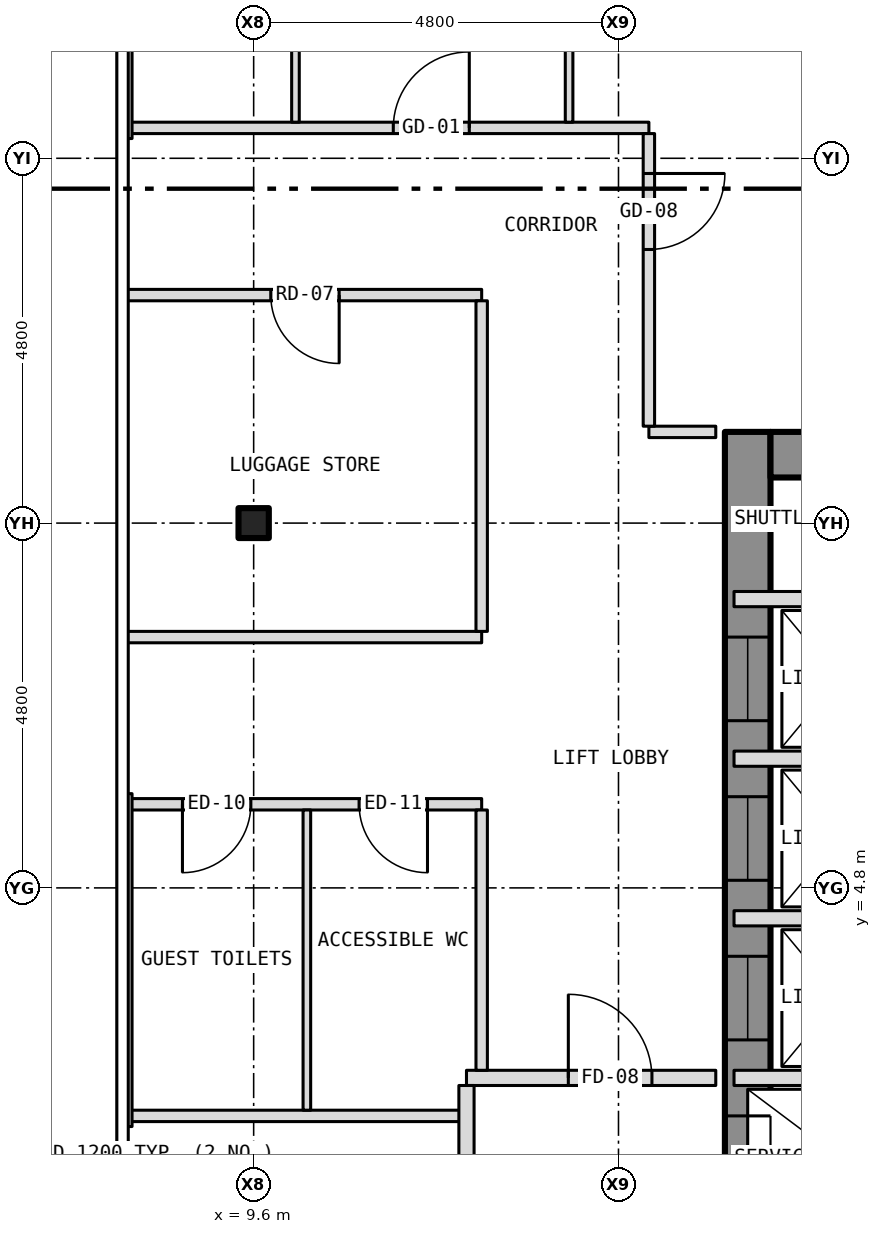
"""IFC4 building model, lengths in metres.
Left out: names, types, materials, properties, quantities, classifications, styles, units other than length and angle.
Written with IfcOpenShell. Run it as: python <this file> out.ifc"""

import sys

from ifc_helpers import new_model, si_unit, direction, frame, frame_2d, origin, origin_2d, place, context, subcontext, project, spatial, rectangle, i_section, extrude, element, fill, save


model = new_model("IFC4")
c1 = context("Model", 3, precision=1e-05, world=origin(), true_north=direction((0.0, 1.0)))
c2 = subcontext(c1, "Body", "Model", "MODEL_VIEW")
j1 = project(units=[si_unit("LENGTHUNIT", "METRE"), si_unit("PLANEANGLEUNIT", "RADIAN")], contexts=[c1])
p1 = place(None, origin())
s1 = spatial("IfcSite", under=j1, at=p1, CompositionType="ELEMENT")
p2 = place(p1, origin())
s2 = spatial("IfcBuilding", under=s1, at=p2, CompositionType="ELEMENT")
p3 = place(p2, frame((0.0, 0.0, 124.0)))
s3 = spatial("IfcBuildingStorey", under=s2, at=p3, CompositionType="ELEMENT", Elevation=124.0)
p4 = place(p3, frame((9.6, 9.6, -0.15), z_axis=(0.0, 0.0, 1.0), x_axis=(1.0, 0.0, 0.0)))
e1 = element("IfcColumn", 1, at=p4, inside=s3, PredefinedType="COLUMN", context=c2, shape_type="SweptSolid", body=[
    extrude(i_section(OverallWidth=0.399, OverallDepth=0.394, WebThickness=0.023, FlangeThickness=0.037, at=origin_2d()), origin(), (0.0, 0.0, 1.0), 3.5),
])
p5 = place(p3, frame((16.1, -10.8, 0.0), z_axis=(0.0, 0.0, 1.0), x_axis=(0.0, 1.0, 0.0)))
e2 = element("IfcWall", 2, at=p5, inside=s3, PredefinedType="SHEAR", context=c2, shape_type="SweptSolid", body=[
    extrude(rectangle(XDim=21.6, YDim=0.6, at=frame_2d((10.8, 0.0))), origin(), (0.0, 0.0, 1.0), 3.25),
])
p6 = place(p5, frame((9.4, 0.0, 0.0)))
e3 = element("IfcOpeningElement", 3, at=p6, cuts=e2, PredefinedType="OPENING", context=c2, shape_type="SweptSolid", body=[
    extrude(rectangle(XDim=1.1, YDim=2.1, at=frame_2d((0.55, 1.05))), frame((0.0, 0.312, 0.0), z_axis=(0.0, -1.0, 0.0), x_axis=(1.0, 0.0, 0.0)), (0.0, 0.0, 1.0), 0.624),
])
p7 = place(p5, frame((11.5, 0.0, 0.0)))
e4 = element("IfcOpeningElement", 4, at=p7, cuts=e2, PredefinedType="OPENING", context=c2, shape_type="SweptSolid", body=[
    extrude(rectangle(XDim=1.1, YDim=2.1, at=frame_2d((0.55, 1.05))), frame((0.0, 0.312, 0.0), z_axis=(0.0, -1.0, 0.0), x_axis=(1.0, 0.0, 0.0)), (0.0, 0.0, 1.0), 0.624),
])
p8 = place(p5, frame((13.6, 0.0, 0.0)))
e5 = element("IfcOpeningElement", 5, at=p8, cuts=e2, PredefinedType="OPENING", context=c2, shape_type="SweptSolid", body=[
    extrude(rectangle(XDim=1.1, YDim=2.1, at=frame_2d((0.55, 1.05))), frame((0.0, 0.312, 0.0), z_axis=(0.0, -1.0, 0.0), x_axis=(1.0, 0.0, 0.0)), (0.0, 0.0, 1.0), 0.624),
])
p9 = place(p5, frame((15.7, 0.0, 0.0)))
e6 = element("IfcOpeningElement", 6, at=p9, cuts=e2, PredefinedType="OPENING", context=c2, shape_type="SweptSolid", body=[
    extrude(rectangle(XDim=1.1, YDim=2.1, at=frame_2d((0.55, 1.05))), frame((0.0, 0.312, 0.0), z_axis=(0.0, -1.0, 0.0), x_axis=(1.0, 0.0, 0.0)), (0.0, 0.0, 1.0), 0.624),
])
p10 = place(p5, frame((17.8, 0.0, 0.0)))
e7 = element("IfcOpeningElement", 7, at=p10, cuts=e2, PredefinedType="OPENING", context=c2, shape_type="SweptSolid", body=[
    extrude(rectangle(XDim=1.1, YDim=2.1, at=frame_2d((0.55, 1.05))), frame((0.0, 0.312, 0.0), z_axis=(0.0, -1.0, 0.0), x_axis=(1.0, 0.0, 0.0)), (0.0, 0.0, 1.0), 0.624),
])
p11 = place(p5, frame((5.642, 0.0, 0.0)))
e8 = element("IfcOpeningElement", 8, at=p11, cuts=e2, PredefinedType="OPENING", context=c2, shape_type="SweptSolid", body=[
    extrude(rectangle(XDim=1.1, YDim=2.1, at=frame_2d((0.55, 1.05))), frame((0.0, 0.312, 0.0), z_axis=(0.0, -1.0, 0.0), x_axis=(1.0, 0.0, 0.0)), (0.0, 0.0, 1.0), 0.624),
])
p12 = place(p5, frame((7.5, 0.0, 0.0)))
e9 = element("IfcOpeningElement", 9, at=p12, cuts=e2, PredefinedType="OPENING", context=c2, shape_type="SweptSolid", body=[
    extrude(rectangle(XDim=1.1, YDim=2.1, at=frame_2d((0.55, 1.05))), frame((0.0, 0.312, 0.0), z_axis=(0.0, -1.0, 0.0), x_axis=(1.0, 0.0, 0.0)), (0.0, 0.0, 1.0), 0.624),
])
p13 = place(p3, frame((16.4, 10.5, 0.0), z_axis=(0.0, 0.0, 1.0), x_axis=(1.0, 0.0, 0.0)))
e10 = element("IfcWall", 10, at=p13, inside=s3, PredefinedType="SHEAR", context=c2, shape_type="SweptSolid", body=[
    extrude(rectangle(XDim=5.8, YDim=0.6, at=frame_2d((2.9, 0.0))), origin(), (0.0, 0.0, 1.0), 3.25),
])
p14 = place(p3, frame((7.875, -1.4, 0.0), z_axis=(0.0, 0.0, 1.0), x_axis=(0.0, 1.0, 0.0)))
e11 = element("IfcWall", 11, at=p14, inside=s3, PredefinedType="SOLIDWALL", context=c2, shape_type="SweptSolid", body=[
    extrude(rectangle(XDim=2.8, YDim=0.2, at=frame_2d((1.4, 0.0))), origin(), (0.0, 0.0, 1.0), 3.5),
])
p15 = place(p14, frame((0.5, 0.0, 0.0)))
e12 = element("IfcOpeningElement", 12, at=p15, cuts=e11, PredefinedType="OPENING", context=c2, shape_type="SweptSolid", body=[
    extrude(rectangle(XDim=1.8, YDim=2.1, at=frame_2d((0.9, 1.05))), frame((0.0, 0.112, 0.0), z_axis=(0.0, -1.0, 0.0), x_axis=(1.0, 0.0, 0.0)), (0.0, 0.0, 1.0), 0.224),
])
p16 = place(p3, frame((7.95, 1.8, 0.0), z_axis=(0.0, 0.0, 1.0), x_axis=(1.0, 0.0, 0.0)))
e13 = element("IfcWall", 13, at=p16, inside=s3, PredefinedType="PARTITIONING", context=c2, shape_type="SweptSolid", body=[
    extrude(rectangle(XDim=4.45, YDim=0.15, at=frame_2d((2.225, 0.0))), origin(), (0.0, 0.0, 1.0), 3.35),
])
p17 = place(p3, frame((12.4, 2.3, 0.0), z_axis=(0.0, 0.0, 1.0), x_axis=(1.0, 0.0, 0.0)))
e14 = element("IfcWall", 14, at=p17, inside=s3, PredefinedType="PARTITIONING", context=c2, shape_type="SweptSolid", body=[
    extrude(rectangle(XDim=3.28, YDim=0.2, at=frame_2d((1.64, 0.0))), origin(), (0.0, 0.0, 1.0), 3.35),
])
p18 = place(p17, frame((1.34, 0.0, 0.0)))
e15 = element("IfcOpeningElement", 15, at=p18, cuts=e14, PredefinedType="OPENING", context=c2, shape_type="SweptSolid", body=[
    extrude(rectangle(XDim=1.1, YDim=2.1, at=frame_2d((0.55, 1.05))), frame((0.0, 0.112, 0.0), z_axis=(0.0, -1.0, 0.0), x_axis=(1.0, 0.0, 0.0)), (0.0, 0.0, 1.0), 0.224),
])
for number, where, z_axis, x_axis in (
    (16, (15.92, 2.3, 0.0), (0.0, 0.0, 1.0), (1.0, 0.0, 0.0)),
    (17, (15.92, 4.4, 0.0), (0.0, 0.0, 1.0), (1.0, 0.0, 0.0)),
):
    element("IfcWall", number, at=place(p3, frame(where, z_axis=z_axis, x_axis=x_axis)), inside=s3, PredefinedType="PARTITIONING", context=c2, shape_type="SweptSolid", body=[
        extrude(rectangle(XDim=2.88, YDim=0.2, at=frame_2d((1.44, 0.0))), origin(), (0.0, 0.0, 1.0), 3.25),
    ])
p19 = place(p3, frame((7.95, 5.9, 0.0), z_axis=(0.0, 0.0, 1.0), x_axis=(1.0, 0.0, 0.0)))
e18 = element("IfcWall", 18, at=p19, inside=s3, PredefinedType="PARTITIONING", context=c2, shape_type="SweptSolid", body=[
    extrude(rectangle(XDim=4.65, YDim=0.15, at=frame_2d((2.325, 0.0))), origin(), (0.0, 0.0, 1.0), 3.35),
])
p20 = place(p19, frame((0.713, 0.0, 0.0)))
e19 = element("IfcOpeningElement", 19, at=p20, cuts=e18, PredefinedType="OPENING", context=c2, shape_type="SweptSolid", body=[
    extrude(rectangle(XDim=0.9, YDim=2.1, at=frame_2d((0.45, 1.05))), frame((0.0, 0.087, 0.0), z_axis=(0.0, -1.0, 0.0), x_axis=(1.0, 0.0, 0.0)), (0.0, 0.0, 1.0), 0.174),
])
p21 = place(p19, frame((3.037, 0.0, 0.0)))
e20 = element("IfcOpeningElement", 20, at=p21, cuts=e18, PredefinedType="OPENING", context=c2, shape_type="SweptSolid", body=[
    extrude(rectangle(XDim=0.9, YDim=2.1, at=frame_2d((0.45, 1.05))), frame((0.0, 0.087, 0.0), z_axis=(0.0, -1.0, 0.0), x_axis=(1.0, 0.0, 0.0)), (0.0, 0.0, 1.0), 0.174),
])
p22 = place(p3, frame((15.92, 6.5, 0.0), z_axis=(0.0, 0.0, 1.0), x_axis=(1.0, 0.0, 0.0)))
e21 = element("IfcWall", 21, at=p22, inside=s3, PredefinedType="PARTITIONING", context=c2, shape_type="SweptSolid", body=[
    extrude(rectangle(XDim=2.88, YDim=0.2, at=frame_2d((1.44, 0.0))), origin(), (0.0, 0.0, 1.0), 3.25),
])
p23 = place(p3, frame((7.92, 8.1, 0.0), z_axis=(0.0, 0.0, 1.0), x_axis=(1.0, 0.0, 0.0)))
e22 = element("IfcWall", 22, at=p23, inside=s3, PredefinedType="PARTITIONING", context=c2, shape_type="SweptSolid", body=[
    extrude(rectangle(XDim=4.68, YDim=0.15, at=frame_2d((2.34, 0.0))), origin(), (0.0, 0.0, 1.0), 3.35),
])
p24 = place(p3, frame((15.92, 8.6, 0.0), z_axis=(0.0, 0.0, 1.0), x_axis=(1.0, 0.0, 0.0)))
e23 = element("IfcWall", 23, at=p24, inside=s3, PredefinedType="PARTITIONING", context=c2, shape_type="SweptSolid", body=[
    extrude(rectangle(XDim=2.88, YDim=0.2, at=frame_2d((1.44, 0.0))), origin(), (0.0, 0.0, 1.0), 3.25),
])
p25 = place(p3, frame((14.8, 10.8, 0.0), z_axis=(0.0, 0.0, 1.0), x_axis=(1.0, 0.0, 0.0)))
e24 = element("IfcWall", 24, at=p25, inside=s3, PredefinedType="PARTITIONING", context=c2, shape_type="SweptSolid", body=[
    extrude(rectangle(XDim=0.88, YDim=0.15, at=frame_2d((0.44, 0.0))), origin(), (0.0, 0.0, 1.0), 3.35),
])
p26 = place(p3, frame((7.92, 12.6, 0.0), z_axis=(0.0, 0.0, 1.0), x_axis=(1.0, 0.0, 0.0)))
e25 = element("IfcWall", 25, at=p26, inside=s3, PredefinedType="PARTITIONING", context=c2, shape_type="SweptSolid", body=[
    extrude(rectangle(XDim=4.68, YDim=0.15, at=frame_2d((2.34, 0.0))), origin(), (0.0, 0.0, 1.0), 3.35),
])
p27 = place(p26, frame((1.905, 0.0, 0.0)))
e26 = element("IfcOpeningElement", 26, at=p27, cuts=e25, PredefinedType="OPENING", context=c2, shape_type="SweptSolid", body=[
    extrude(rectangle(XDim=0.9, YDim=2.1, at=frame_2d((0.45, 1.05))), frame((0.0, 0.087, 0.0), z_axis=(0.0, -1.0, 0.0), x_axis=(1.0, 0.0, 0.0)), (0.0, 0.0, 1.0), 0.174),
])
p28 = place(p3, frame((7.95, 14.8, 0.0), z_axis=(0.0, 0.0, 1.0), x_axis=(1.0, 0.0, 0.0)))
e27 = element("IfcWall", 27, at=p28, inside=s3, PredefinedType="PARTITIONING", context=c2, shape_type="SweptSolid", body=[
    extrude(rectangle(XDim=6.85, YDim=0.15, at=frame_2d((3.425, 0.0))), origin(), (0.0, 0.0, 1.0), 3.35),
])
p29 = place(p28, frame((3.487, 0.0, 0.0)))
e28 = element("IfcOpeningElement", 28, at=p29, cuts=e27, PredefinedType="OPENING", context=c2, shape_type="SweptSolid", body=[
    extrude(rectangle(XDim=1.0, YDim=2.1, at=frame_2d((0.5, 1.05))), frame((0.0, 0.087, 0.0), z_axis=(0.0, -1.0, 0.0), x_axis=(1.0, 0.0, 0.0)), (0.0, 0.0, 1.0), 0.174),
])
p30 = place(p3, frame((7.95, 1.66, 0.0), z_axis=(0.0, 0.0, 1.0), x_axis=(0.0, 1.0, 0.0)))
e29 = element("IfcWall", 29, at=p30, inside=s3, PredefinedType="PARTITIONING", context=c2, shape_type="SweptSolid", body=[
    extrude(rectangle(XDim=4.38, YDim=0.1, at=frame_2d((2.19, 0.0))), origin(), (0.0, 0.0, 1.0), 2.733),
])
p31 = place(p3, frame((7.95, 14.66, 0.0), z_axis=(0.0, 0.0, 1.0), x_axis=(0.0, 1.0, 0.0)))
e30 = element("IfcWall", 30, at=p31, inside=s3, PredefinedType="PARTITIONING", context=c2, shape_type="SweptSolid", body=[
    extrude(rectangle(XDim=3.48, YDim=0.1, at=frame_2d((1.74, 0.0))), origin(), (0.0, 0.0, 1.0), 2.733),
])
p32 = place(p3, frame((10.15, 14.875, 0.0), z_axis=(0.0, 0.0, 1.0), x_axis=(0.0, 1.0, 0.0)))
e31 = element("IfcWall", 31, at=p32, inside=s3, PredefinedType="PARTITIONING", context=c2, shape_type="SweptSolid", body=[
    extrude(rectangle(XDim=3.075, YDim=0.1, at=frame_2d((1.538, 0.0))), origin(), (0.0, 0.0, 1.0), 3.35),
])
p33 = place(p32, frame((1.971, 0.0, 0.0)))
e32 = element("IfcOpeningElement", 32, at=p33, cuts=e31, PredefinedType="OPENING", context=c2, shape_type="SweptSolid", body=[
    extrude(rectangle(XDim=0.9, YDim=2.1, at=frame_2d((0.45, 1.05))), frame((0.0, 0.062, 0.0), z_axis=(0.0, -1.0, 0.0), x_axis=(1.0, 0.0, 0.0)), (0.0, 0.0, 1.0), 0.124),
])
p34 = place(p3, frame((10.3, 1.875, 0.0), z_axis=(0.0, 0.0, 1.0), x_axis=(0.0, 1.0, 0.0)))
e33 = element("IfcWall", 33, at=p34, inside=s3, PredefinedType="PARTITIONING", context=c2, shape_type="SweptSolid", body=[
    extrude(rectangle(XDim=3.95, YDim=0.1, at=frame_2d((1.975, 0.0))), origin(), (0.0, 0.0, 1.0), 3.35),
])
p35 = place(p3, frame((12.4, -1.8, 0.0), z_axis=(0.0, 0.0, 1.0), x_axis=(0.0, 1.0, 0.0)))
e34 = element("IfcWall", 34, at=p35, inside=s3, PredefinedType="PARTITIONING", context=c2, shape_type="SweptSolid", body=[
    extrude(rectangle(XDim=4.0, YDim=0.2, at=frame_2d((2.0, 0.0))), origin(), (0.0, 0.0, 1.0), 3.35),
])
p36 = place(p35, frame((1.25, 0.0, 0.0)))
e35 = element("IfcOpeningElement", 35, at=p36, cuts=e34, PredefinedType="OPENING", context=c2, shape_type="SweptSolid", body=[
    extrude(rectangle(XDim=1.1, YDim=2.1, at=frame_2d((0.55, 1.05))), frame((0.0, 0.112, 0.0), z_axis=(0.0, -1.0, 0.0), x_axis=(1.0, 0.0, 0.0)), (0.0, 0.0, 1.0), 0.224),
])
p37 = place(p3, frame((12.6, 2.4, 0.0), z_axis=(0.0, 0.0, 1.0), x_axis=(0.0, 1.0, 0.0)))
e36 = element("IfcWall", 36, at=p37, inside=s3, PredefinedType="PARTITIONING", context=c2, shape_type="SweptSolid", body=[
    extrude(rectangle(XDim=3.425, YDim=0.15, at=frame_2d((1.712, 0.0))), origin(), (0.0, 0.0, 1.0), 3.35),
])
p38 = place(p3, frame((12.6, 8.175, 0.0), z_axis=(0.0, 0.0, 1.0), x_axis=(0.0, 1.0, 0.0)))
e37 = element("IfcWall", 37, at=p38, inside=s3, PredefinedType="PARTITIONING", context=c2, shape_type="SweptSolid", body=[
    extrude(rectangle(XDim=4.35, YDim=0.15, at=frame_2d((2.175, 0.0))), origin(), (0.0, 0.0, 1.0), 3.35),
])
p39 = place(p3, frame((13.75, 14.875, 0.0), z_axis=(0.0, 0.0, 1.0), x_axis=(0.0, 1.0, 0.0)))
e38 = element("IfcWall", 38, at=p39, inside=s3, PredefinedType="PARTITIONING", context=c2, shape_type="SweptSolid", body=[
    extrude(rectangle(XDim=7.805, YDim=0.1, at=frame_2d((3.902, 0.0))), origin(), (0.0, 0.0, 1.0), 3.35),
])
p40 = place(p3, frame((14.8, 10.875, 0.0), z_axis=(0.0, 0.0, 1.0), x_axis=(0.0, 1.0, 0.0)))
e39 = element("IfcWall", 39, at=p40, inside=s3, PredefinedType="PARTITIONING", context=c2, shape_type="SweptSolid", body=[
    extrude(rectangle(XDim=3.85, YDim=0.15, at=frame_2d((1.925, 0.0))), origin(), (0.0, 0.0, 1.0), 3.35),
])
p41 = place(p40, frame((2.325, 0.0, 0.0)))
e40 = element("IfcOpeningElement", 40, at=p41, cuts=e39, PredefinedType="OPENING", context=c2, shape_type="SweptSolid", body=[
    extrude(rectangle(XDim=1.0, YDim=2.1, at=frame_2d((0.5, 1.05))), frame((0.0, 0.087, 0.0), z_axis=(0.0, -1.0, 0.0), x_axis=(1.0, 0.0, 0.0)), (0.0, 0.0, 1.0), 0.174),
])
p42 = place(p7, origin())
e41 = element("IfcDoor", 41, at=p42, inside=s3, OperationType="SLIDING_TO_LEFT", PredefinedType="DOOR", context=c2, shape_type="SweptSolid", body=[
    extrude(rectangle(XDim=1.1, YDim=2.1, at=frame_2d((0.55, 1.05))), frame((0.0, 0.025, 0.0), z_axis=(0.0, -1.0, 0.0), x_axis=(1.0, 0.0, 0.0)), (0.0, 0.0, 1.0), 0.05),
])
fill(e4, e41)
p43 = place(p8, origin())
e42 = element("IfcDoor", 42, at=p43, inside=s3, OperationType="SLIDING_TO_LEFT", PredefinedType="DOOR", context=c2, shape_type="SweptSolid", body=[
    extrude(rectangle(XDim=1.1, YDim=2.1, at=frame_2d((0.55, 1.05))), frame((0.0, 0.025, 0.0), z_axis=(0.0, -1.0, 0.0), x_axis=(1.0, 0.0, 0.0)), (0.0, 0.0, 1.0), 0.05),
])
fill(e5, e42)
p44 = place(p9, origin())
e43 = element("IfcDoor", 43, at=p44, inside=s3, OperationType="SLIDING_TO_LEFT", PredefinedType="DOOR", context=c2, shape_type="SweptSolid", body=[
    extrude(rectangle(XDim=1.1, YDim=2.1, at=frame_2d((0.55, 1.05))), frame((0.0, 0.025, 0.0), z_axis=(0.0, -1.0, 0.0), x_axis=(1.0, 0.0, 0.0)), (0.0, 0.0, 1.0), 0.05),
])
fill(e6, e43)
p45 = place(p10, origin())
e44 = element("IfcDoor", 44, at=p45, inside=s3, OperationType="SLIDING_TO_LEFT", PredefinedType="DOOR", context=c2, shape_type="SweptSolid", body=[
    extrude(rectangle(XDim=1.1, YDim=2.1, at=frame_2d((0.55, 1.05))), frame((0.0, 0.025, 0.0), z_axis=(0.0, -1.0, 0.0), x_axis=(1.0, 0.0, 0.0)), (0.0, 0.0, 1.0), 0.05),
])
fill(e7, e44)
p46 = place(p18, origin())
e45 = element("IfcDoor", 45, at=p46, inside=s3, OperationType="SINGLE_SWING_LEFT", PredefinedType="DOOR", context=c2, shape_type="SweptSolid", body=[
    extrude(rectangle(XDim=1.1, YDim=2.1, at=frame_2d((0.55, 1.05))), frame((0.0, 0.025, 0.0), z_axis=(0.0, -1.0, 0.0), x_axis=(1.0, 0.0, 0.0)), (0.0, 0.0, 1.0), 0.05),
])
fill(e15, e45)
p47 = place(p29, origin())
e46 = element("IfcDoor", 46, at=p47, inside=s3, OperationType="SINGLE_SWING_RIGHT", PredefinedType="DOOR", context=c2, shape_type="SweptSolid", body=[
    extrude(rectangle(XDim=1.0, YDim=2.1, at=frame_2d((0.5, 1.05))), frame((0.0, 0.025, 0.0), z_axis=(0.0, -1.0, 0.0), x_axis=(1.0, 0.0, 0.0)), (0.0, 0.0, 1.0), 0.05),
])
fill(e28, e46)
p48 = place(p41, origin())
e47 = element("IfcDoor", 47, at=p48, inside=s3, OperationType="SINGLE_SWING_RIGHT", PredefinedType="DOOR", context=c2, shape_type="SweptSolid", body=[
    extrude(rectangle(XDim=1.0, YDim=2.1, at=frame_2d((0.5, 1.05))), frame((0.0, 0.025, 0.0), z_axis=(0.0, -1.0, 0.0), x_axis=(1.0, 0.0, 0.0)), (0.0, 0.0, 1.0), 0.05),
])
fill(e40, e47)
p49 = place(p20, origin())
e48 = element("IfcDoor", 48, at=p49, inside=s3, OperationType="SINGLE_SWING_LEFT", PredefinedType="DOOR", context=c2, shape_type="SweptSolid", body=[
    extrude(rectangle(XDim=0.9, YDim=2.1, at=frame_2d((0.45, 1.05))), frame((0.0, 0.025, 0.0), z_axis=(0.0, -1.0, 0.0), x_axis=(1.0, 0.0, 0.0)), (0.0, 0.0, 1.0), 0.05),
])
fill(e19, e48)
p50 = place(p21, origin())
e49 = element("IfcDoor", 49, at=p50, inside=s3, OperationType="SINGLE_SWING_RIGHT", PredefinedType="DOOR", context=c2, shape_type="SweptSolid", body=[
    extrude(rectangle(XDim=0.9, YDim=2.1, at=frame_2d((0.45, 1.05))), frame((0.0, 0.025, 0.0), z_axis=(0.0, -1.0, 0.0), x_axis=(1.0, 0.0, 0.0)), (0.0, 0.0, 1.0), 0.05),
])
fill(e20, e49)
p51 = place(p27, origin())
e50 = element("IfcDoor", 50, at=p51, inside=s3, OperationType="SINGLE_SWING_RIGHT", PredefinedType="DOOR", context=c2, shape_type="SweptSolid", body=[
    extrude(rectangle(XDim=0.9, YDim=2.1, at=frame_2d((0.45, 1.05))), frame((0.0, 0.025, 0.0), z_axis=(0.0, -1.0, 0.0), x_axis=(1.0, 0.0, 0.0)), (0.0, 0.0, 1.0), 0.05),
])
fill(e26, e50)
save(model, sys.argv[1])
